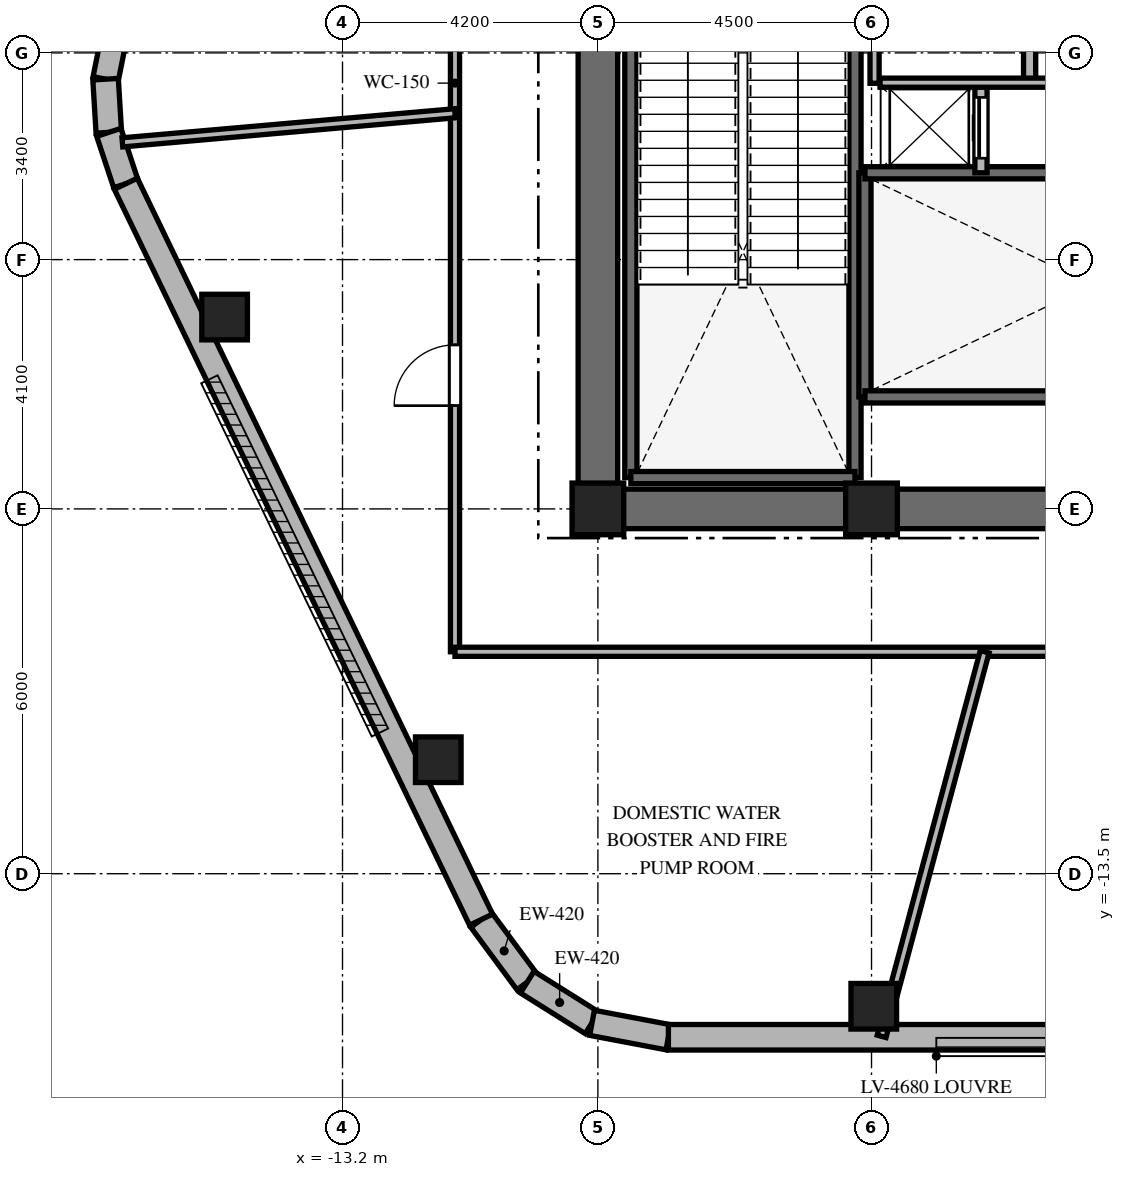
"""IFC4 building model, lengths in metres.
Left out: names, types, materials, properties, quantities, classifications, styles, units other than length and angle.
Written with IfcOpenShell. Run it as: python <this file> out.ifc"""

import sys

from ifc_helpers import new_model, si_unit, direction, frame, frame_2d, origin, origin_2d, place, context, subcontext, project, spatial, rectangle, extrude, element, fill, save


model = new_model("IFC4")
c1 = context("Model", 3, precision=1e-05, world=origin(), true_north=direction((0.0, 1.0)))
c2 = subcontext(c1, "Body", "Model", "MODEL_VIEW")
j1 = project(units=[si_unit("LENGTHUNIT", "METRE"), si_unit("PLANEANGLEUNIT", "RADIAN")], contexts=[c1])
p1 = place(None, origin())
s1 = spatial("IfcSite", under=j1, at=p1, CompositionType="ELEMENT")
p2 = place(p1, origin())
s2 = spatial("IfcBuilding", under=s1, at=p2, CompositionType="ELEMENT")
p3 = place(p2, frame((0.0, 0.0, 310.4)))
s3 = spatial("IfcBuildingStorey", under=s2, at=p3, CompositionType="ELEMENT", Elevation=310.4)
p4 = place(p3, frame((-9.325, -7.5, 0.0), z_axis=(0.0, 0.0, 1.0), x_axis=(1.0, 0.0, 0.0)))
e1 = element("IfcWall", 1, at=p4, inside=s3, PredefinedType="SHEAR", context=c2, shape_type="SweptSolid", body=[
    extrude(rectangle(XDim=18.65, YDim=0.65, at=frame_2d((9.325, 0.0))), origin(), (0.0, 0.0, 1.0), 5.5),
])
p5 = place(p4, frame((9.375, 0.0, 0.0)))
e2 = element("IfcOpeningElement", 2, at=p5, cuts=e1, PredefinedType="OPENING", context=c2, shape_type="SweptSolid", body=[
    extrude(rectangle(XDim=1.0, YDim=2.15, at=frame_2d((0.5, 1.075))), frame((0.0, 0.335, 0.0), z_axis=(0.0, -1.0, 0.0), x_axis=(1.0, 0.0, 0.0)), (0.0, 0.0, 1.0), 0.67),
])
p6 = place(p3, frame((-9.0, -7.175, 0.0), z_axis=(0.0, 0.0, 1.0), x_axis=(0.0, 1.0, 0.0)))
e3 = element("IfcWall", 3, at=p6, inside=s3, PredefinedType="SHEAR", context=c2, shape_type="SweptSolid", body=[
    extrude(rectangle(XDim=14.35, YDim=0.65, at=frame_2d((7.175, 0.0))), origin(), (0.0, 0.0, 1.0), 5.5),
])
p7 = place(p6, frame((10.3, 0.0, 0.0)))
e4 = element("IfcOpeningElement", 4, at=p7, cuts=e3, PredefinedType="OPENING", context=c2, shape_type="SweptSolid", body=[
    extrude(rectangle(XDim=1.05, YDim=2.15, at=frame_2d((0.525, 1.075))), frame((0.0, 0.335, 0.0), z_axis=(0.0, -1.0, 0.0), x_axis=(1.0, 0.0, 0.0)), (0.0, 0.0, 1.0), 0.67),
])
for number, where, z_axis, x_axis in (
    (5, (-8.458, -6.985, 0.0), (0.0, 0.0, 1.0), (0.0, 1.0, 0.0)),
    (6, (-4.772, -6.985, 0.0), (0.0, 0.0, 1.0), (0.0, 1.0, 0.0)),
):
    element("IfcWall", number, at=place(p3, frame(where, z_axis=z_axis, x_axis=x_axis)), inside=s3, PredefinedType="SHEAR", context=c2, shape_type="SweptSolid", body=[
        extrude(rectangle(XDim=9.143, YDim=0.2, at=frame_2d((4.572, 0.0))), origin(), (0.0, 0.0, 1.0), 5.5),
    ])
for number, where, z_axis, x_axis in (
    (7, (-8.458, -6.985, 0.0), (0.0, 0.0, 1.0), (1.0, 0.0, 0.0)),
    (8, (-4.608, -5.658, 0.0), (0.0, 0.0, 1.0), (0.0, 1.0, 0.0)),
):
    element("IfcWall", number, at=place(p3, frame(where, z_axis=z_axis, x_axis=x_axis)), inside=s3, PredefinedType="SHEAR", context=c2, shape_type="SweptSolid", body=[
        extrude(rectangle(XDim=3.686, YDim=0.2, at=frame_2d((1.843, 0.0))), origin(), (0.0, 0.0, 1.0), 5.5),
    ])
p8 = place(p3, frame((-4.608, -5.658, 0.0), z_axis=(0.0, 0.0, 1.0), x_axis=(1.0, 0.0, 0.0)))
e9 = element("IfcWall", 9, at=p8, inside=s3, PredefinedType="SHEAR", context=c2, shape_type="SweptSolid", body=[
    extrude(rectangle(XDim=9.166, YDim=0.2, at=frame_2d((4.583, 0.0))), origin(), (0.0, 0.0, 1.0), 5.5),
])
p9 = place(p8, frame((7.45, 0.0, 0.0)))
e10 = element("IfcOpeningElement", 10, at=p9, cuts=e9, PredefinedType="OPENING", context=c2, shape_type="SweptSolid", body=[
    extrude(rectangle(XDim=1.0, YDim=2.15, at=frame_2d((0.5, 1.075))), frame((0.0, 0.11, 0.0), z_axis=(0.0, -1.0, 0.0), x_axis=(1.0, 0.0, 0.0)), (0.0, 0.0, 1.0), 0.22),
])
p10 = place(p3, frame((-4.608, -1.972, 0.0), z_axis=(0.0, 0.0, 1.0), x_axis=(1.0, 0.0, 0.0)))
e11 = element("IfcWall", 11, at=p10, inside=s3, PredefinedType="SHEAR", context=c2, shape_type="SweptSolid", body=[
    extrude(rectangle(XDim=9.166, YDim=0.2, at=frame_2d((4.583, 0.0))), origin(), (0.0, 0.0, 1.0), 5.5),
])
for number, where, z_axis, x_axis in (
    (12, (-9.0, -7.5, 0.0), (0.0, 0.0, 1.0), (1.0, 0.0, 0.0)),
    (13, (-4.5, -7.5, 0.0), (0.0, 0.0, 1.0), (1.0, 0.0, 0.0)),
):
    element("IfcColumn", number, at=place(p3, frame(where, z_axis=z_axis, x_axis=x_axis)), inside=s3, PredefinedType="COLUMN", context=c2, shape_type="SweptSolid", body=[
        extrude(rectangle(XDim=0.85, YDim=0.85, at=origin_2d()), origin(), (0.0, 0.0, 1.0), 5.5),
    ])
for number, where, z_axis, x_axis in (
    (14, (-4.463, -15.68, 0.0), (0.0, 0.0, 1.0), (1.0, 0.0, 0.0)),
    (15, (-15.139, -4.345, 0.0), (0.0, 0.0, 1.0), (1.0, 0.0, 0.0)),
    (16, (-11.625, -11.625, 0.0), (0.0, 0.0, 1.0), (1.0, 0.0, 0.0)),
):
    element("IfcColumn", number, at=place(p3, frame(where, z_axis=z_axis, x_axis=x_axis)), inside=s3, PredefinedType="COLUMN", context=c2, shape_type="SweptSolid", body=[
        extrude(rectangle(XDim=0.75, YDim=0.75, at=origin_2d()), origin(), (0.0, 0.0, 1.0), 5.5),
    ])
p11 = place(p3, frame((-10.922, -14.256, 0.0), z_axis=(0.0, 0.0, 1.0), x_axis=(0.594423284796, -0.804152322941, 0.0)))
e17 = element("IfcWall", 17, at=p11, inside=s3, PredefinedType="SOLIDWALL", context=c2, shape_type="SweptSolid", body=[
    extrude(rectangle(XDim=1.278, YDim=0.42, at=frame_2d((0.639, 0.0))), origin(), (0.0, 0.0, 1.0), 5.18),
])
p12 = place(p3, frame((-10.162, -15.284, 0.0), z_axis=(0.0, 0.0, 1.0), x_axis=(0.846993641169, -0.53160302089, 0.0)))
e18 = element("IfcWall", 18, at=p12, inside=s3, PredefinedType="SOLIDWALL", context=c2, shape_type="SweptSolid", body=[
    extrude(rectangle(XDim=1.258, YDim=0.42, at=frame_2d((0.629, 0.0))), origin(), (0.0, 0.0, 1.0), 5.18),
])
p13 = place(p3, frame((-9.096, -15.952, 0.0), z_axis=(0.0, 0.0, 1.0), x_axis=(0.982583442004, -0.185821902637, 0.0)))
e19 = element("IfcWall", 19, at=p13, inside=s3, PredefinedType="SOLIDWALL", context=c2, shape_type="SweptSolid", body=[
    extrude(rectangle(XDim=1.278, YDim=0.42, at=frame_2d((0.639, 0.0))), origin(), (0.0, 0.0, 1.0), 5.18),
])
p14 = place(p3, frame((-16.921, 0.44, 0.0), z_axis=(0.0, 0.0, 1.0), x_axis=(-0.197170749138, -0.980369162961, 0.0)))
e20 = element("IfcWall", 20, at=p14, inside=s3, PredefinedType="SOLIDWALL", context=c2, shape_type="SweptSolid", body=[
    extrude(rectangle(XDim=0.89, YDim=0.42, at=frame_2d((0.445, 0.0))), origin(), (0.0, 0.0, 1.0), 5.18),
])
p15 = place(p3, frame((-17.096, -0.433, 0.0), z_axis=(0.0, 0.0, 1.0), x_axis=(0.060469820114, -0.998170026025, 0.0)))
e21 = element("IfcWall", 21, at=p15, inside=s3, PredefinedType="SOLIDWALL", context=c2, shape_type="SweptSolid", body=[
    extrude(rectangle(XDim=0.876, YDim=0.42, at=frame_2d((0.438, 0.0))), origin(), (0.0, 0.0, 1.0), 5.18),
])
p16 = place(p3, frame((-17.043, -1.307, 0.0), z_axis=(0.0, 0.0, 1.0), x_axis=(0.314581701602, -0.949230400386, 0.0)))
e22 = element("IfcWall", 22, at=p16, inside=s3, PredefinedType="SOLIDWALL", context=c2, shape_type="SweptSolid", body=[
    extrude(rectangle(XDim=0.89, YDim=0.42, at=frame_2d((0.445, 0.0))), origin(), (0.0, 0.0, 1.0), 5.18),
])
p17 = place(p3, frame((-7.84, -16.19, 0.0), z_axis=(0.0, 0.0, 1.0), x_axis=(1.0, 0.0, 0.0)))
e23 = element("IfcWall", 23, at=p17, inside=s3, PredefinedType="SOLIDWALL", context=c2, shape_type="SweptSolid", body=[
    extrude(rectangle(XDim=16.946, YDim=0.42, at=frame_2d((8.473, 0.0))), origin(), (0.0, 0.0, 1.0), 5.18),
])
p18 = place(p3, frame((-16.763, -2.152, 0.0), z_axis=(0.0, 0.0, 1.0), x_axis=(0.434664735238, -0.900592342817, 0.0)))
e24 = element("IfcWall", 24, at=p18, inside=s3, PredefinedType="SOLIDWALL", context=c2, shape_type="SweptSolid", body=[
    extrude(rectangle(XDim=13.44, YDim=0.42, at=frame_2d((6.72, 0.0))), origin(), (0.0, 0.0, 1.0), 5.18),
])
p19 = place(p3, frame((-2.7, -1.972, 0.0), z_axis=(0.0, 0.0, 1.0), x_axis=(0.0, 1.0, 0.0)))
e25 = element("IfcWall", 25, at=p19, inside=s3, PredefinedType="PARTITIONING", context=c2, shape_type="SweptSolid", body=[
    extrude(rectangle(XDim=1.472, YDim=0.2, at=frame_2d((0.736, 0.0))), origin(), (0.0, 0.0, 1.0), 5.18),
])
p20 = place(p19, frame((0.24, 0.0, 0.0)))
e26 = element("IfcOpeningElement", 26, at=p20, cuts=e25, PredefinedType="OPENING", context=c2, shape_type="SweptSolid", body=[
    extrude(rectangle(XDim=1.0, YDim=2.2, at=frame_2d((0.5, 1.1))), frame((0.0, 0.11, 0.0), z_axis=(0.0, -1.0, 0.0), x_axis=(1.0, 0.0, 0.0)), (0.0, 0.0, 1.0), 0.22),
])
p21 = place(p3, frame((-4.45, -0.5, 0.0), z_axis=(0.0, 0.0, 1.0), x_axis=(0.0, 1.0, 0.0)))
e27 = element("IfcWall", 27, at=p21, inside=s3, PredefinedType="PARTITIONING", context=c2, shape_type="SweptSolid", body=[
    extrude(rectangle(XDim=2.75, YDim=0.15, at=frame_2d((1.375, 0.0))), origin(), (0.0, 0.0, 1.0), 5.18),
])
p22 = place(p3, frame((-1.9, -0.5, 0.0), z_axis=(0.0, 0.0, 1.0), x_axis=(0.0, 1.0, 0.0)))
e28 = element("IfcWall", 28, at=p22, inside=s3, PredefinedType="PARTITIONING", context=c2, shape_type="SweptSolid", body=[
    extrude(rectangle(XDim=4.44, YDim=0.2, at=frame_2d((2.22, 0.0))), origin(), (0.0, 0.0, 1.0), 5.18),
])
p23 = place(p22, frame((1.5, 0.0, 0.0)))
e29 = element("IfcOpeningElement", 29, at=p23, cuts=e28, PredefinedType="OPENING", context=c2, shape_type="SweptSolid", body=[
    extrude(rectangle(XDim=0.85, YDim=2.03, at=frame_2d((0.425, 1.015))), frame((0.0, 0.11, 0.0), z_axis=(0.0, -1.0, 0.0), x_axis=(1.0, 0.0, 0.0)), (0.0, 0.0, 1.0), 0.22),
])
p24 = place(p3, frame((-4.36, -0.49, 0.0), z_axis=(0.0, 0.0, 1.0), x_axis=(1.0, 0.0, 0.0)))
e30 = element("IfcWall", 30, at=p24, inside=s3, PredefinedType="PARTITIONING", context=c2, shape_type="SweptSolid", body=[
    extrude(rectangle(XDim=8.72, YDim=0.15, at=frame_2d((4.36, 0.0))), origin(), (0.0, 0.0, 1.0), 5.18),
])
p25 = place(p24, frame((3.86, 0.0, 0.0)))
e31 = element("IfcOpeningElement", 31, at=p25, cuts=e30, PredefinedType="OPENING", context=c2, shape_type="SweptSolid", body=[
    extrude(rectangle(XDim=0.9, YDim=2.03, at=frame_2d((0.45, 1.015))), frame((0.0, 0.085, 0.0), z_axis=(0.0, -1.0, 0.0), x_axis=(1.0, 0.0, 0.0)), (0.0, 0.0, 1.0), 0.17),
])
p26 = place(p3, frame((-11.35, -9.85, 0.0), z_axis=(0.0, 0.0, 1.0), x_axis=(0.0, 1.0, 0.0)))
e32 = element("IfcWall", 32, at=p26, inside=s3, PredefinedType="PARTITIONING", context=c2, shape_type="SweptSolid", body=[
    extrude(rectangle(XDim=19.7, YDim=0.15, at=frame_2d((9.85, 0.0))), origin(), (0.0, 0.0, 1.0), 4.67),
])
p27 = place(p26, frame((13.658, 0.0, 0.0)))
e33 = element("IfcOpeningElement", 33, at=p27, cuts=e32, PredefinedType="OPENING", context=c2, shape_type="SweptSolid", body=[
    extrude(rectangle(XDim=1.0, YDim=2.15, at=frame_2d((0.5, 1.075))), frame((0.0, 0.085, 0.0), z_axis=(0.0, -1.0, 0.0), x_axis=(1.0, 0.0, 0.0)), (0.0, 0.0, 1.0), 0.17),
])
p28 = place(p26, frame((4.048, 0.0, 0.0)))
e34 = element("IfcOpeningElement", 34, at=p28, cuts=e32, PredefinedType="OPENING", context=c2, shape_type="SweptSolid", body=[
    extrude(rectangle(XDim=1.0, YDim=2.15, at=frame_2d((0.5, 1.075))), frame((0.0, 0.085, 0.0), z_axis=(0.0, -1.0, 0.0), x_axis=(1.0, 0.0, 0.0)), (0.0, 0.0, 1.0), 0.17),
])
p29 = place(p3, frame((11.35, -9.85, 0.0), z_axis=(0.0, 0.0, 1.0), x_axis=(-1.0, 0.0, 0.0)))
e35 = element("IfcWall", 35, at=p29, inside=s3, PredefinedType="PARTITIONING", context=c2, shape_type="SweptSolid", body=[
    extrude(rectangle(XDim=22.7, YDim=0.15, at=frame_2d((11.35, 0.0))), origin(), (0.0, 0.0, 1.0), 4.67),
])
p30 = place(p3, frame((-11.35, -0.993, 0.0), z_axis=(0.0, 0.0, 1.0), x_axis=(-0.996191883408, -0.087187908746, 0.0)))
e36 = element("IfcWall", 36, at=p30, inside=s3, PredefinedType="PARTITIONING", context=c2, shape_type="SweptSolid", body=[
    extrude(rectangle(XDim=5.491, YDim=0.15, at=frame_2d((2.746, 0.0))), origin(), (0.0, 0.0, 1.0), 4.52),
])
p31 = place(p3, frame((-2.639, -9.85, 0.0), z_axis=(0.0, 0.0, 1.0), x_axis=(-0.258792616312, -0.965932907475, 0.0)))
e37 = element("IfcWall", 37, at=p31, inside=s3, PredefinedType="PARTITIONING", context=c2, shape_type="SweptSolid", body=[
    extrude(rectangle(XDim=6.548, YDim=0.15, at=frame_2d((3.274, 0.0))), origin(), (0.0, 0.0, 1.0), 4.52),
])
p32 = place(p20, origin())
e38 = element("IfcDoor", 38, at=p32, inside=s3, OperationType="SLIDING_TO_LEFT", PredefinedType="DOOR", context=c2, shape_type="SweptSolid", body=[
    extrude(rectangle(XDim=1.0, YDim=2.2, at=frame_2d((0.5, 1.1))), frame((0.0, 0.025, 0.0), z_axis=(0.0, -1.0, 0.0), x_axis=(1.0, 0.0, 0.0)), (0.0, 0.0, 1.0), 0.05),
])
fill(e26, e38)
p33 = place(p28, origin())
e39 = element("IfcDoor", 39, at=p33, inside=s3, OperationType="SINGLE_SWING_LEFT", PredefinedType="DOOR", context=c2, shape_type="SweptSolid", body=[
    extrude(rectangle(XDim=1.0, YDim=2.15, at=frame_2d((0.5, 1.075))), frame((0.0, 0.025, 0.0), z_axis=(0.0, -1.0, 0.0), x_axis=(1.0, 0.0, 0.0)), (0.0, 0.0, 1.0), 0.05),
])
fill(e34, e39)
save(model, sys.argv[1])
